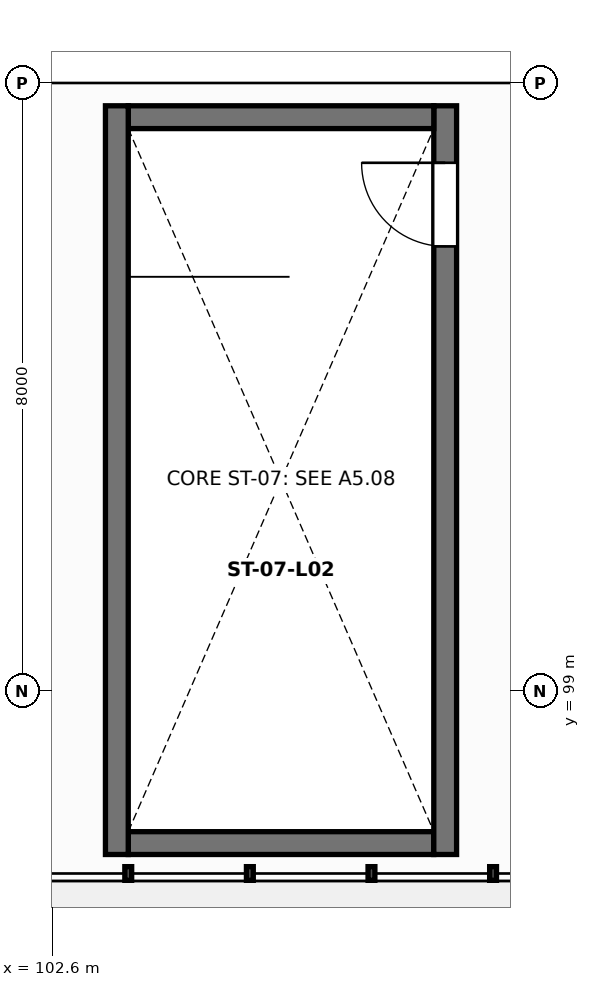
"""IFC4 building model, lengths in metres.
Left out: names, types, materials, properties, quantities, classifications, styles, units other than length and angle.
Written with IfcOpenShell. Run it as: python <this file> out.ifc"""

import sys

from ifc_helpers import new_model, si_unit, direction, frame, frame_2d, origin, place, context, subcontext, project, spatial, rectangle, extrude, element, fill, save


model = new_model("IFC4")
c1 = context("Model", 3, precision=1e-05, world=origin(), true_north=direction((0.0, 1.0)))
c2 = subcontext(c1, "Body", "Model", "MODEL_VIEW")
j1 = project(units=[si_unit("LENGTHUNIT", "METRE"), si_unit("PLANEANGLEUNIT", "RADIAN")], contexts=[c1])
p1 = place(None, origin())
s1 = spatial("IfcSite", under=j1, at=p1, CompositionType="ELEMENT")
p2 = place(p1, origin())
s2 = spatial("IfcBuilding", under=s1, at=p2, CompositionType="ELEMENT")
p3 = place(p2, frame((0.0, 0.0, 11.2)))
s3 = spatial("IfcBuildingStorey", under=s2, at=p3, CompositionType="ELEMENT", Elevation=11.2)
p4 = place(p3, frame((103.6, 97.0, 0.0), z_axis=(0.0, 0.0, 1.0), x_axis=(1.0, 0.0, 0.0)))
e1 = element("IfcWall", 1, at=p4, inside=s3, PredefinedType="SHEAR", context=c2, shape_type="SweptSolid", body=[
    extrude(rectangle(XDim=4.02, YDim=0.3, at=frame_2d((2.01, 0.0))), origin(), (0.0, 0.0, 1.0), 2.55),
])
p5 = place(p3, frame((107.77, 96.85, 0.0), z_axis=(0.0, 0.0, 1.0), x_axis=(0.0, 1.0, 0.0)))
e2 = element("IfcWall", 2, at=p5, inside=s3, PredefinedType="SHEAR", context=c2, shape_type="SweptSolid", body=[
    extrude(rectangle(XDim=9.85, YDim=0.3, at=frame_2d((4.925, 0.0))), origin(), (0.0, 0.0, 1.0), 2.55),
])
p6 = place(p5, frame((8.0, 0.0, 0.0)))
e3 = element("IfcOpeningElement", 3, at=p6, cuts=e2, PredefinedType="OPENING", context=c2, shape_type="SweptSolid", body=[
    extrude(rectangle(XDim=1.1, YDim=2.15, at=frame_2d((0.55, 1.075))), frame((0.0, 0.16, 0.0), z_axis=(0.0, -1.0, 0.0), x_axis=(1.0, 0.0, 0.0)), (0.0, 0.0, 1.0), 0.32),
])
p7 = place(p3, frame((107.62, 106.55, 0.0), z_axis=(0.0, 0.0, 1.0), x_axis=(-1.0, 0.0, 0.0)))
e4 = element("IfcWall", 4, at=p7, inside=s3, PredefinedType="SHEAR", context=c2, shape_type="SweptSolid", body=[
    extrude(rectangle(XDim=4.02, YDim=0.3, at=frame_2d((2.01, 0.0))), origin(), (0.0, 0.0, 1.0), 2.55),
])
p8 = place(p3, frame((103.45, 106.7, 0.0), z_axis=(0.0, 0.0, 1.0), x_axis=(0.0, -1.0, 0.0)))
e5 = element("IfcWall", 5, at=p8, inside=s3, PredefinedType="SHEAR", context=c2, shape_type="SweptSolid", body=[
    extrude(rectangle(XDim=9.85, YDim=0.3, at=frame_2d((4.925, 0.0))), origin(), (0.0, 0.0, 1.0), 2.55),
])
p9 = place(p6, origin())
e6 = element("IfcDoor", 6, at=p9, inside=s3, OperationType="SINGLE_SWING_RIGHT", PredefinedType="DOOR", context=c2, shape_type="SweptSolid", body=[
    extrude(rectangle(XDim=1.1, YDim=2.15, at=frame_2d((0.55, 1.075))), frame((0.0, 0.025, 0.0), z_axis=(0.0, -1.0, 0.0), x_axis=(1.0, 0.0, 0.0)), (0.0, 0.0, 1.0), 0.05),
])
fill(e3, e6)
save(model, sys.argv[1])
